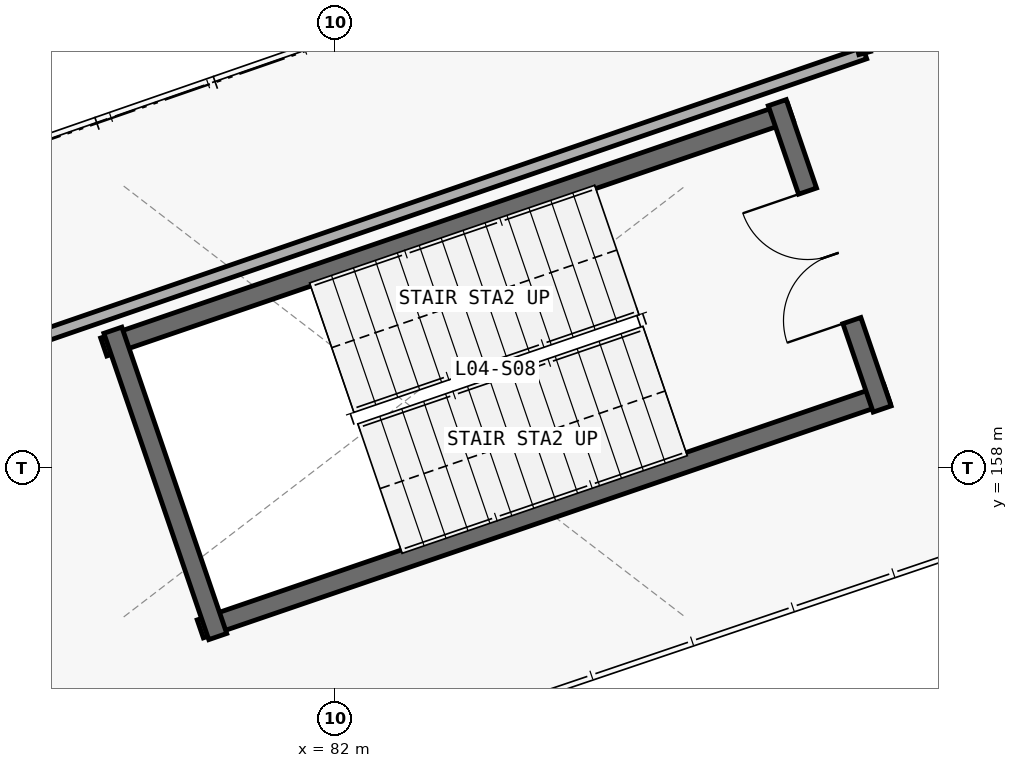
"""IFC4 building model, lengths in metres.
Left out: names, types, materials, properties, quantities, classifications, styles, units other than length and angle.
Written with IfcOpenShell. Run it as: python <this file> out.ifc"""

import sys

from ifc_helpers import new_model, si_unit, direction, frame, frame_2d, origin, place, context, subcontext, project, spatial, rectangle, extrude, element, fill, save


model = new_model("IFC4")
c1 = context("Model", 3, precision=1e-05, world=origin(), true_north=direction((0.0, 1.0)))
c2 = subcontext(c1, "Body", "Model", "MODEL_VIEW")
j1 = project(units=[si_unit("LENGTHUNIT", "METRE"), si_unit("PLANEANGLEUNIT", "RADIAN")], contexts=[c1])
p1 = place(None, origin())
s1 = spatial("IfcSite", under=j1, at=p1, CompositionType="ELEMENT")
p2 = place(p1, origin())
s2 = spatial("IfcBuilding", under=s1, at=p2, CompositionType="ELEMENT")
p3 = place(p2, frame((0.0, 0.0, 19.8)))
s3 = spatial("IfcBuildingStorey", under=s2, at=p3, CompositionType="ELEMENT", Elevation=19.8)
p4 = place(p3, frame((87.993, 162.686, 0.0), z_axis=(0.0, 0.0, 1.0), x_axis=(-0.946064424228, -0.323978556712, 0.0)))
e1 = element("IfcWall", 1, at=p4, inside=s3, PredefinedType="SHEAR", context=c2, shape_type="SweptSolid", body=[
    extrude(rectangle(XDim=9.55, YDim=0.25, at=frame_2d((4.775, 0.0))), origin(), (0.0, 0.0, 1.0), 4.54),
])
p5 = place(p3, frame((80.228, 155.883, 0.0), z_axis=(0.0, 0.0, 1.0), x_axis=(0.946067107432, 0.323970721263, 0.0)))
e2 = element("IfcWall", 2, at=p5, inside=s3, PredefinedType="SHEAR", context=c2, shape_type="SweptSolid", body=[
    extrude(rectangle(XDim=9.55, YDim=0.25, at=frame_2d((4.775, 0.0))), origin(), (0.0, 0.0, 1.0), 4.54),
])
p6 = place(p3, frame((89.199, 158.776, 0.0), z_axis=(0.0, 0.0, 1.0), x_axis=(-0.323988758717, 0.946060930504, 0.0)))
e3 = element("IfcWall", 3, at=p6, inside=s3, PredefinedType="SHEAR", context=c2, shape_type="SweptSolid", body=[
    extrude(rectangle(XDim=4.26, YDim=0.25, at=frame_2d((2.13, 0.0))), origin(), (0.0, 0.0, 1.0), 4.54),
])
p7 = place(p6, frame((1.23, 0.0, 0.0)))
e4 = element("IfcOpeningElement", 4, at=p7, cuts=e3, PredefinedType="OPENING", context=c2, shape_type="SweptSolid", body=[
    extrude(rectangle(XDim=1.8, YDim=2.25, at=frame_2d((0.9, 1.125))), frame((0.0, 0.135, 0.0), z_axis=(0.0, -1.0, 0.0), x_axis=(1.0, 0.0, 0.0)), (0.0, 0.0, 1.0), 0.27),
])
p8 = place(p3, frame((79.078, 159.812, 0.0), z_axis=(0.0, 0.0, 1.0), x_axis=(0.323971192516, -0.946066946056, 0.0)))
e5 = element("IfcWall", 5, at=p8, inside=s3, PredefinedType="SHEAR", context=c2, shape_type="SweptSolid", body=[
    extrude(rectangle(XDim=4.26, YDim=0.25, at=frame_2d((2.13, 0.0))), origin(), (0.0, 0.0, 1.0), 4.54),
])
p9 = place(p3, frame((88.97, 163.459, 0.0), z_axis=(0.0, 0.0, 1.0), x_axis=(-0.945509956828, -0.32559318411, 0.0)))
e6 = element("IfcWall", 6, at=p9, inside=s3, PredefinedType="PARTITIONING", context=c2, shape_type="SweptSolid", body=[
    extrude(rectangle(XDim=22.697, YDim=0.16, at=frame_2d((11.348, 0.0))), origin(), (0.0, 0.0, 1.0), 3.665),
])
p10 = place(p9, frame((17.423, 0.0, 0.0)))
e7 = element("IfcOpeningElement", 7, at=p10, cuts=e6, PredefinedType="OPENING", context=c2, shape_type="SweptSolid", body=[
    extrude(rectangle(XDim=1.9, YDim=2.25, at=frame_2d((0.95, 1.125))), frame((0.0, 0.09, 0.0), z_axis=(0.0, -1.0, 0.0), x_axis=(1.0, 0.0, 0.0)), (0.0, 0.0, 1.0), 0.18),
])
p11 = place(p3, frame((88.97, 163.459, 0.0), z_axis=(0.0, 0.0, 1.0), x_axis=(-0.258550707932, 0.965997687072, 0.0)))
e8 = element("IfcWall", 8, at=p11, inside=s3, PredefinedType="PARTITIONING", context=c2, shape_type="SweptSolid", body=[
    extrude(rectangle(XDim=1.01, YDim=0.16, at=frame_2d((0.505, 0.0))), origin(), (0.0, 0.0, 1.0), 3.665),
])
p12 = place(p7, origin())
e9 = element("IfcDoor", 9, at=p12, inside=s3, OperationType="DOUBLE_DOOR_SINGLE_SWING", PredefinedType="DOOR", context=c2, shape_type="SweptSolid", body=[
    extrude(rectangle(XDim=1.8, YDim=2.25, at=frame_2d((0.9, 1.125))), frame((0.0, 0.025, 0.0), z_axis=(0.0, -1.0, 0.0), x_axis=(1.0, 0.0, 0.0)), (0.0, 0.0, 1.0), 0.05),
])
fill(e4, e9)
save(model, sys.argv[1])
